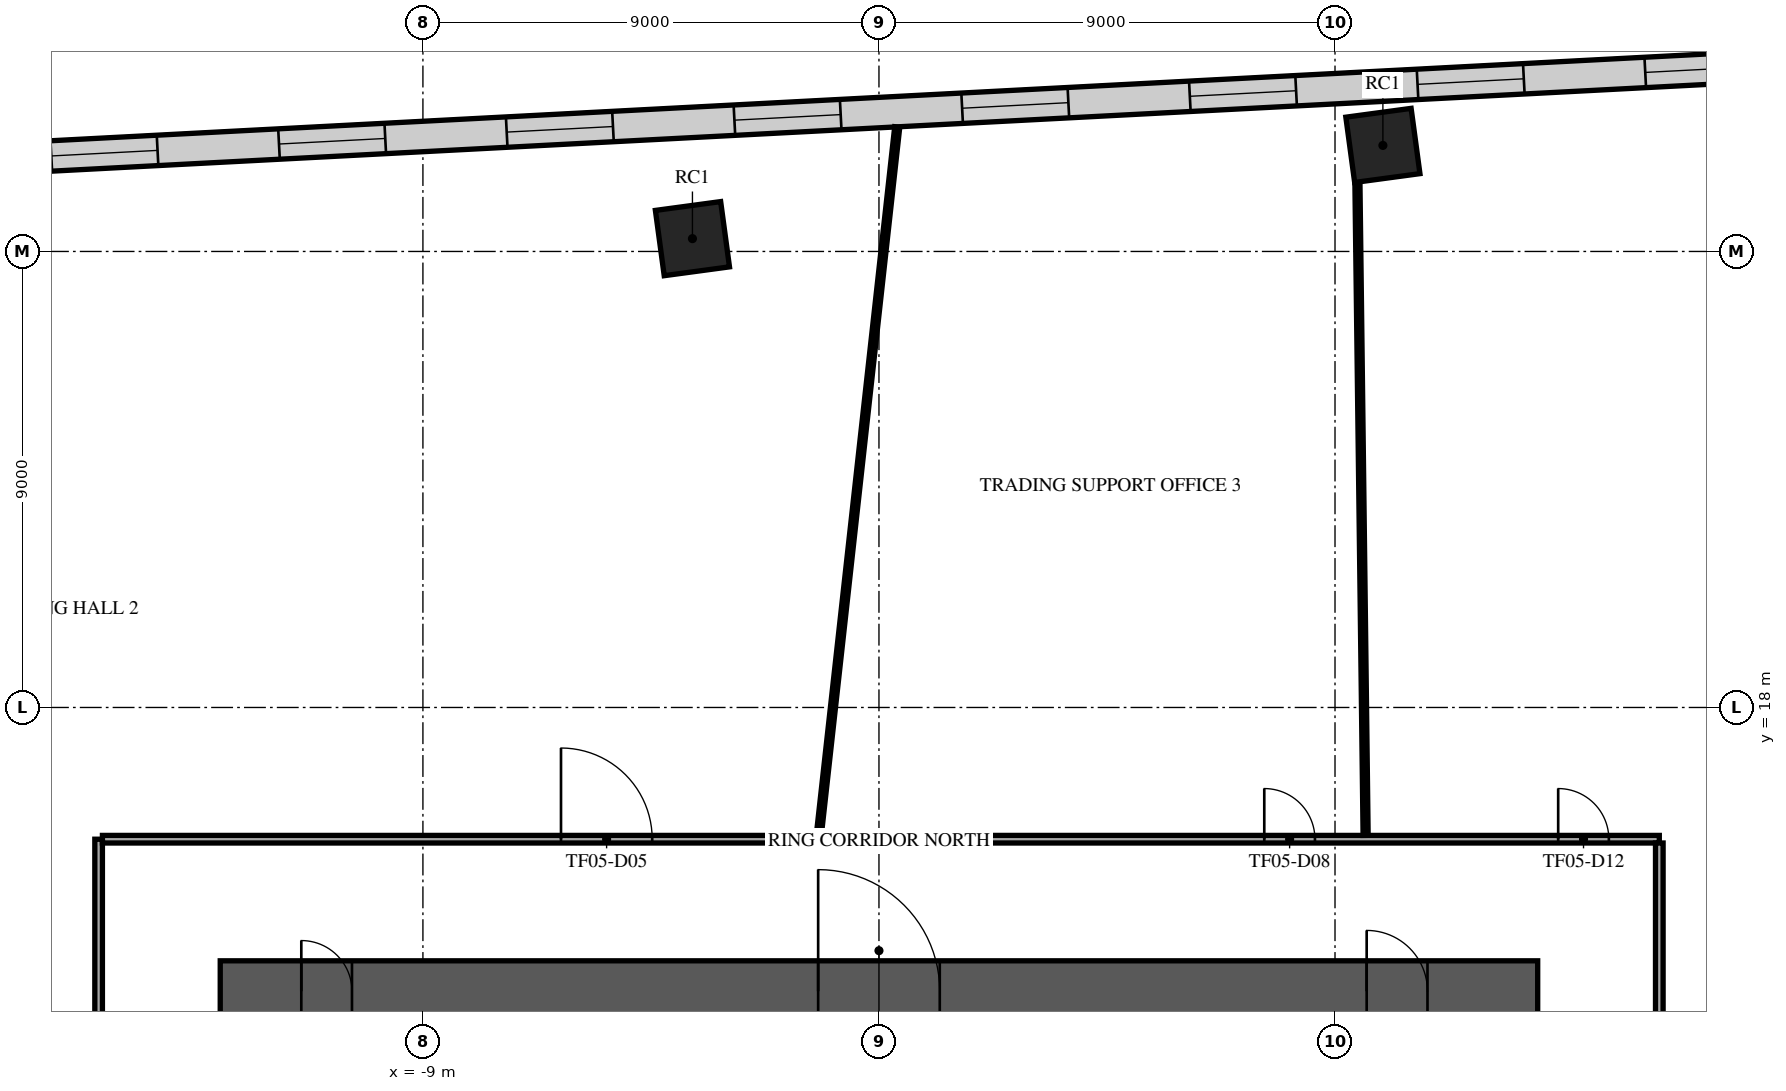
"""IFC4 building model, lengths in metres.
Left out: names, types, materials, properties, quantities, classifications, styles, units other than length and angle.
Written with IfcOpenShell. Run it as: python <this file> out.ifc"""

import sys

from ifc_helpers import new_model, si_unit, direction, frame, frame_2d, origin, origin_2d, place, context, subcontext, project, spatial, rectangle, extrude, element, fill, save


model = new_model("IFC4")
c1 = context("Model", 3, precision=1e-05, world=origin(), true_north=direction((0.0, 1.0)))
c2 = subcontext(c1, "Body", "Model", "MODEL_VIEW")
j1 = project(units=[si_unit("LENGTHUNIT", "METRE"), si_unit("PLANEANGLEUNIT", "RADIAN")], contexts=[c1])
p1 = place(None, origin())
s1 = spatial("IfcSite", under=j1, at=p1, CompositionType="ELEMENT")
p2 = place(p1, origin())
s2 = spatial("IfcBuilding", under=s1, at=p2, CompositionType="ELEMENT")
p3 = place(p2, frame((0.0, 0.0, 27.3)))
s3 = spatial("IfcBuildingStorey", under=s2, at=p3, CompositionType="ELEMENT", Elevation=27.3)
for number, where, z_axis, x_axis in (
    (1, (9.945, 29.093, 0.0), (0.0, 0.0, 1.0), (0.991, 0.134, 0.0)),
    (2, (-3.681, 27.253, 0.0), (0.0, 0.0, 1.0), (0.991, 0.134, 0.0)),
):
    element("IfcColumn", number, at=place(p3, frame(where, z_axis=z_axis, x_axis=x_axis)), inside=s3, PredefinedType="COLUMN", context=c2, shape_type="SweptSolid", body=[
        extrude(rectangle(XDim=1.3, YDim=1.3, at=origin_2d()), origin(), (0.0, 0.0, 1.0), 4.8),
    ])
p4 = place(p3, frame((-13.0, 12.4, 0.0), z_axis=(0.0, 0.0, 1.0), x_axis=(1.0, 0.0, 0.0)))
e3 = element("IfcWall", 3, at=p4, inside=s3, PredefinedType="SHEAR", context=c2, shape_type="SweptSolid", body=[
    extrude(rectangle(XDim=26.0, YDim=1.2, at=frame_2d((13.0, 0.0))), origin(), (0.0, 0.0, 1.0), 4.35),
])
p5 = place(p4, frame((11.8, 0.0, 0.0)))
e4 = element("IfcOpeningElement", 4, at=p5, cuts=e3, PredefinedType="OPENING", context=c2, shape_type="SweptSolid", body=[
    extrude(rectangle(XDim=2.4, YDim=2.4, at=frame_2d((1.2, 1.2))), frame((0.0, 0.61, 0.0), z_axis=(0.0, -1.0, 0.0), x_axis=(1.0, 0.0, 0.0)), (0.0, 0.0, 1.0), 1.22),
])
p6 = place(p4, frame((22.625, 0.0, 0.0)))
e5 = element("IfcOpeningElement", 5, at=p6, cuts=e3, PredefinedType="OPENING", context=c2, shape_type="SweptSolid", body=[
    extrude(rectangle(XDim=1.2, YDim=2.1, at=frame_2d((0.6, 1.05))), frame((0.0, 0.61, 0.0), z_axis=(0.0, -1.0, 0.0), x_axis=(1.0, 0.0, 0.0)), (0.0, 0.0, 1.0), 1.22),
])
p7 = place(p4, frame((1.6, 0.0, 0.0)))
e6 = element("IfcOpeningElement", 6, at=p7, cuts=e3, PredefinedType="OPENING", context=c2, shape_type="SweptSolid", body=[
    extrude(rectangle(XDim=1.0, YDim=2.1, at=frame_2d((0.5, 1.05))), frame((0.0, 0.61, 0.0), z_axis=(0.0, -1.0, 0.0), x_axis=(1.0, 0.0, 0.0)), (0.0, 0.0, 1.0), 1.22),
])
p8 = place(p3, frame((22.912, 30.941, 0.0), z_axis=(0.0, 0.0, 1.0), x_axis=(-0.998629687104, -0.052333049168, 0.0)))
e7 = element("IfcWall", 7, at=p8, inside=s3, PredefinedType="STANDARD", context=c2, shape_type="SweptSolid", body=[
    extrude(rectangle(XDim=49.376, YDim=0.6, at=frame_2d((24.688, 0.0))), origin(), (0.0, 0.0, 1.0), 4.35),
])
p9 = place(p8, frame((1.2, 0.0, 0.9)))
e8 = element("IfcOpeningElement", 8, at=p9, cuts=e7, PredefinedType="OPENING", context=c2, shape_type="SweptSolid", body=[
    extrude(rectangle(XDim=2.1, YDim=2.7, at=frame_2d((1.05, 1.35))), frame((0.0, 0.31, 0.0), z_axis=(0.0, -1.0, 0.0), x_axis=(1.0, 0.0, 0.0)), (0.0, 0.0, 1.0), 0.62),
])
p10 = place(p8, frame((5.7, 0.0, 0.9)))
e9 = element("IfcOpeningElement", 9, at=p10, cuts=e7, PredefinedType="OPENING", context=c2, shape_type="SweptSolid", body=[
    extrude(rectangle(XDim=2.1, YDim=2.7, at=frame_2d((1.05, 1.35))), frame((0.0, 0.31, 0.0), z_axis=(0.0, -1.0, 0.0), x_axis=(1.0, 0.0, 0.0)), (0.0, 0.0, 1.0), 0.62),
])
p11 = place(p8, frame((10.2, 0.0, 0.9)))
e10 = element("IfcOpeningElement", 10, at=p11, cuts=e7, PredefinedType="OPENING", context=c2, shape_type="SweptSolid", body=[
    extrude(rectangle(XDim=2.1, YDim=2.7, at=frame_2d((1.05, 1.35))), frame((0.0, 0.31, 0.0), z_axis=(0.0, -1.0, 0.0), x_axis=(1.0, 0.0, 0.0)), (0.0, 0.0, 1.0), 0.62),
])
p12 = place(p8, frame((14.7, 0.0, 0.9)))
e11 = element("IfcOpeningElement", 11, at=p12, cuts=e7, PredefinedType="OPENING", context=c2, shape_type="SweptSolid", body=[
    extrude(rectangle(XDim=2.1, YDim=2.7, at=frame_2d((1.05, 1.35))), frame((0.0, 0.31, 0.0), z_axis=(0.0, -1.0, 0.0), x_axis=(1.0, 0.0, 0.0)), (0.0, 0.0, 1.0), 0.62),
])
p13 = place(p8, frame((19.2, 0.0, 0.9)))
e12 = element("IfcOpeningElement", 12, at=p13, cuts=e7, PredefinedType="OPENING", context=c2, shape_type="SweptSolid", body=[
    extrude(rectangle(XDim=2.1, YDim=2.7, at=frame_2d((1.05, 1.35))), frame((0.0, 0.31, 0.0), z_axis=(0.0, -1.0, 0.0), x_axis=(1.0, 0.0, 0.0)), (0.0, 0.0, 1.0), 0.62),
])
p14 = place(p8, frame((23.7, 0.0, 0.9)))
e13 = element("IfcOpeningElement", 13, at=p14, cuts=e7, PredefinedType="OPENING", context=c2, shape_type="SweptSolid", body=[
    extrude(rectangle(XDim=2.1, YDim=2.7, at=frame_2d((1.05, 1.35))), frame((0.0, 0.31, 0.0), z_axis=(0.0, -1.0, 0.0), x_axis=(1.0, 0.0, 0.0)), (0.0, 0.0, 1.0), 0.62),
])
p15 = place(p8, frame((28.2, 0.0, 0.9)))
e14 = element("IfcOpeningElement", 14, at=p15, cuts=e7, PredefinedType="OPENING", context=c2, shape_type="SweptSolid", body=[
    extrude(rectangle(XDim=2.1, YDim=2.7, at=frame_2d((1.05, 1.35))), frame((0.0, 0.31, 0.0), z_axis=(0.0, -1.0, 0.0), x_axis=(1.0, 0.0, 0.0)), (0.0, 0.0, 1.0), 0.62),
])
p16 = place(p8, frame((32.7, 0.0, 0.9)))
e15 = element("IfcOpeningElement", 15, at=p16, cuts=e7, PredefinedType="OPENING", context=c2, shape_type="SweptSolid", body=[
    extrude(rectangle(XDim=2.1, YDim=2.7, at=frame_2d((1.05, 1.35))), frame((0.0, 0.31, 0.0), z_axis=(0.0, -1.0, 0.0), x_axis=(1.0, 0.0, 0.0)), (0.0, 0.0, 1.0), 0.62),
])
p17 = place(p8, frame((37.2, 0.0, 0.9)))
e16 = element("IfcOpeningElement", 16, at=p17, cuts=e7, PredefinedType="OPENING", context=c2, shape_type="SweptSolid", body=[
    extrude(rectangle(XDim=2.1, YDim=2.7, at=frame_2d((1.05, 1.35))), frame((0.0, 0.31, 0.0), z_axis=(0.0, -1.0, 0.0), x_axis=(1.0, 0.0, 0.0)), (0.0, 0.0, 1.0), 0.62),
])
p18 = place(p8, frame((41.7, 0.0, 0.9)))
e17 = element("IfcOpeningElement", 17, at=p18, cuts=e7, PredefinedType="OPENING", context=c2, shape_type="SweptSolid", body=[
    extrude(rectangle(XDim=2.1, YDim=2.7, at=frame_2d((1.05, 1.35))), frame((0.0, 0.31, 0.0), z_axis=(0.0, -1.0, 0.0), x_axis=(1.0, 0.0, 0.0)), (0.0, 0.0, 1.0), 0.62),
])
p19 = place(p8, frame((46.138, 0.0, 0.9)))
e18 = element("IfcOpeningElement", 18, at=p19, cuts=e7, PredefinedType="OPENING", context=c2, shape_type="SweptSolid", body=[
    extrude(rectangle(XDim=2.1, YDim=2.7, at=frame_2d((1.05, 1.35))), frame((0.0, 0.31, 0.0), z_axis=(0.0, -1.0, 0.0), x_axis=(1.0, 0.0, 0.0)), (0.0, 0.0, 1.0), 0.62),
])
p20 = place(p3, frame((-15.4, -15.4, 0.0), z_axis=(0.0, 0.0, 1.0), x_axis=(0.0, 1.0, 0.0)))
e19 = element("IfcWall", 19, at=p20, inside=s3, PredefinedType="PARTITIONING", context=c2, shape_type="SweptSolid", body=[
    extrude(rectangle(XDim=30.8, YDim=0.15, at=frame_2d((15.4, 0.0))), origin(), (0.0, 0.0, 1.0), 3.85),
])
p21 = place(p20, frame((17.342, 0.0, 0.0)))
e20 = element("IfcOpeningElement", 20, at=p21, cuts=e19, PredefinedType="OPENING", context=c2, shape_type="SweptSolid", body=[
    extrude(rectangle(XDim=1.8, YDim=2.1, at=frame_2d((0.9, 1.05))), frame((0.0, 0.085, 0.0), z_axis=(0.0, -1.0, 0.0), x_axis=(1.0, 0.0, 0.0)), (0.0, 0.0, 1.0), 0.17),
])
p22 = place(p20, frame((21.842, 0.0, 0.0)))
e21 = element("IfcOpeningElement", 21, at=p22, cuts=e19, PredefinedType="OPENING", context=c2, shape_type="SweptSolid", body=[
    extrude(rectangle(XDim=1.0, YDim=2.1, at=frame_2d((0.5, 1.05))), frame((0.0, 0.085, 0.0), z_axis=(0.0, -1.0, 0.0), x_axis=(1.0, 0.0, 0.0)), (0.0, 0.0, 1.0), 0.17),
])
p23 = place(p20, frame((4.05, 0.0, 0.0)))
e22 = element("IfcOpeningElement", 22, at=p23, cuts=e19, PredefinedType="OPENING", context=c2, shape_type="SweptSolid", body=[
    extrude(rectangle(XDim=1.8, YDim=2.1, at=frame_2d((0.9, 1.05))), frame((0.0, 0.085, 0.0), z_axis=(0.0, -1.0, 0.0), x_axis=(1.0, 0.0, 0.0)), (0.0, 0.0, 1.0), 0.17),
])
p24 = place(p20, frame((10.05, 0.0, 0.0)))
e23 = element("IfcOpeningElement", 23, at=p24, cuts=e19, PredefinedType="OPENING", context=c2, shape_type="SweptSolid", body=[
    extrude(rectangle(XDim=1.0, YDim=2.1, at=frame_2d((0.5, 1.05))), frame((0.0, 0.085, 0.0), z_axis=(0.0, -1.0, 0.0), x_axis=(1.0, 0.0, 0.0)), (0.0, 0.0, 1.0), 0.17),
])
p25 = place(p20, frame((24.266, 0.0, 0.0)))
e24 = element("IfcOpeningElement", 24, at=p25, cuts=e19, PredefinedType="OPENING", context=c2, shape_type="SweptSolid", body=[
    extrude(rectangle(XDim=1.0, YDim=2.1, at=frame_2d((0.5, 1.05))), frame((0.0, 0.085, 0.0), z_axis=(0.0, -1.0, 0.0), x_axis=(1.0, 0.0, 0.0)), (0.0, 0.0, 1.0), 0.17),
])
p26 = place(p3, frame((-15.325, 15.4, 0.0), z_axis=(0.0, 0.0, 1.0), x_axis=(1.0, 0.0, 0.0)))
e25 = element("IfcWall", 25, at=p26, inside=s3, PredefinedType="PARTITIONING", context=c2, shape_type="SweptSolid", body=[
    extrude(rectangle(XDim=30.725, YDim=0.15, at=frame_2d((15.362, 0.0))), origin(), (0.0, 0.0, 1.0), 3.85),
])
p27 = place(p26, frame((9.05, 0.0, 0.0)))
e26 = element("IfcOpeningElement", 26, at=p27, cuts=e25, PredefinedType="OPENING", context=c2, shape_type="SweptSolid", body=[
    extrude(rectangle(XDim=1.8, YDim=2.1, at=frame_2d((0.9, 1.05))), frame((0.0, 0.085, 0.0), z_axis=(0.0, -1.0, 0.0), x_axis=(1.0, 0.0, 0.0)), (0.0, 0.0, 1.0), 0.17),
])
p28 = place(p26, frame((22.929, 0.0, 0.0)))
e27 = element("IfcOpeningElement", 27, at=p28, cuts=e25, PredefinedType="OPENING", context=c2, shape_type="SweptSolid", body=[
    extrude(rectangle(XDim=1.0, YDim=2.1, at=frame_2d((0.5, 1.05))), frame((0.0, 0.085, 0.0), z_axis=(0.0, -1.0, 0.0), x_axis=(1.0, 0.0, 0.0)), (0.0, 0.0, 1.0), 0.17),
])
p29 = place(p26, frame((28.729, 0.0, 0.0)))
e28 = element("IfcOpeningElement", 28, at=p29, cuts=e25, PredefinedType="OPENING", context=c2, shape_type="SweptSolid", body=[
    extrude(rectangle(XDim=1.0, YDim=2.1, at=frame_2d((0.5, 1.05))), frame((0.0, 0.085, 0.0), z_axis=(0.0, -1.0, 0.0), x_axis=(1.0, 0.0, 0.0)), (0.0, 0.0, 1.0), 0.17),
])
p30 = place(p3, frame((15.4, -15.325, 0.0), z_axis=(0.0, 0.0, 1.0), x_axis=(0.0, 1.0, 0.0)))
e29 = element("IfcWall", 29, at=p30, inside=s3, PredefinedType="PARTITIONING", context=c2, shape_type="SweptSolid", body=[
    extrude(rectangle(XDim=30.65, YDim=0.15, at=frame_2d((15.325, 0.0))), origin(), (0.0, 0.0, 1.0), 3.85),
])
p31 = place(p30, frame((25.068, 0.0, 0.0)))
e30 = element("IfcOpeningElement", 30, at=p31, cuts=e29, PredefinedType="OPENING", context=c2, shape_type="SweptSolid", body=[
    extrude(rectangle(XDim=1.8, YDim=2.1, at=frame_2d((0.9, 1.05))), frame((0.0, 0.085, 0.0), z_axis=(0.0, -1.0, 0.0), x_axis=(1.0, 0.0, 0.0)), (0.0, 0.0, 1.0), 0.17),
])
p32 = place(p30, frame((10.927, 0.0, 0.0)))
e31 = element("IfcOpeningElement", 31, at=p32, cuts=e29, PredefinedType="OPENING", context=c2, shape_type="SweptSolid", body=[
    extrude(rectangle(XDim=1.0, YDim=2.1, at=frame_2d((0.5, 1.05))), frame((0.0, 0.085, 0.0), z_axis=(0.0, -1.0, 0.0), x_axis=(1.0, 0.0, 0.0)), (0.0, 0.0, 1.0), 0.17),
])
p33 = place(p3, frame((-1.187, 15.48, 0.0), z_axis=(0.0, 0.0, 1.0), x_axis=(0.110071375312, 0.993923685369, 0.0)))
e32 = element("IfcWall", 32, at=p33, inside=s3, PredefinedType="PARTITIONING", context=c2, shape_type="SweptSolid", body=[
    extrude(rectangle(XDim=14.062, YDim=0.1, at=frame_2d((7.031, 0.0))), origin(), (0.0, 0.0, 1.0), 3.55),
])
p34 = place(p3, frame((9.442, 28.369, 0.0), z_axis=(0.0, 0.0, 1.0), x_axis=(0.01255297586, -0.999921208294, 0.0)))
e33 = element("IfcWall", 33, at=p34, inside=s3, PredefinedType="PARTITIONING", context=c2, shape_type="SweptSolid", body=[
    extrude(rectangle(XDim=12.895, YDim=0.1, at=frame_2d((6.447, 0.0))), origin(), (0.0, 0.0, 1.0), 3.85),
])
p35 = place(p5, origin())
e34 = element("IfcDoor", 34, at=p35, inside=s3, OperationType="SINGLE_SWING_LEFT", PredefinedType="DOOR", context=c2, shape_type="SweptSolid", body=[
    extrude(rectangle(XDim=2.4, YDim=2.4, at=frame_2d((1.2, 1.2))), frame((0.0, 0.025, 0.0), z_axis=(0.0, -1.0, 0.0), x_axis=(1.0, 0.0, 0.0)), (0.0, 0.0, 1.0), 0.05),
])
fill(e4, e34)
p36 = place(p6, origin())
e35 = element("IfcDoor", 35, at=p36, inside=s3, OperationType="SINGLE_SWING_LEFT", PredefinedType="DOOR", context=c2, shape_type="SweptSolid", body=[
    extrude(rectangle(XDim=1.2, YDim=2.1, at=frame_2d((0.6, 1.05))), frame((0.0, 0.025, 0.0), z_axis=(0.0, -1.0, 0.0), x_axis=(1.0, 0.0, 0.0)), (0.0, 0.0, 1.0), 0.05),
])
fill(e5, e35)
p37 = place(p7, origin())
e36 = element("IfcDoor", 36, at=p37, inside=s3, OperationType="SINGLE_SWING_LEFT", PredefinedType="DOOR", context=c2, shape_type="SweptSolid", body=[
    extrude(rectangle(XDim=1.0, YDim=2.1, at=frame_2d((0.5, 1.05))), frame((0.0, 0.025, 0.0), z_axis=(0.0, -1.0, 0.0), x_axis=(1.0, 0.0, 0.0)), (0.0, 0.0, 1.0), 0.05),
])
fill(e6, e36)
p38 = place(p10, origin())
e37 = element("IfcWindow", 37, at=p38, inside=s3, PartitioningType="SINGLE_PANEL", PredefinedType="WINDOW", context=c2, shape_type="SweptSolid", body=[
    extrude(rectangle(XDim=2.1, YDim=2.7, at=frame_2d((1.05, 1.35))), frame((0.0, 0.03, 0.0), z_axis=(0.0, -1.0, 0.0), x_axis=(1.0, 0.0, 0.0)), (0.0, 0.0, 1.0), 0.06),
])
fill(e9, e37)
p39 = place(p11, origin())
e38 = element("IfcWindow", 38, at=p39, inside=s3, PartitioningType="SINGLE_PANEL", PredefinedType="WINDOW", context=c2, shape_type="SweptSolid", body=[
    extrude(rectangle(XDim=2.1, YDim=2.7, at=frame_2d((1.05, 1.35))), frame((0.0, 0.03, 0.0), z_axis=(0.0, -1.0, 0.0), x_axis=(1.0, 0.0, 0.0)), (0.0, 0.0, 1.0), 0.06),
])
fill(e10, e38)
p40 = place(p12, origin())
e39 = element("IfcWindow", 39, at=p40, inside=s3, PartitioningType="SINGLE_PANEL", PredefinedType="WINDOW", context=c2, shape_type="SweptSolid", body=[
    extrude(rectangle(XDim=2.1, YDim=2.7, at=frame_2d((1.05, 1.35))), frame((0.0, 0.03, 0.0), z_axis=(0.0, -1.0, 0.0), x_axis=(1.0, 0.0, 0.0)), (0.0, 0.0, 1.0), 0.06),
])
fill(e11, e39)
p41 = place(p13, origin())
e40 = element("IfcWindow", 40, at=p41, inside=s3, PartitioningType="SINGLE_PANEL", PredefinedType="WINDOW", context=c2, shape_type="SweptSolid", body=[
    extrude(rectangle(XDim=2.1, YDim=2.7, at=frame_2d((1.05, 1.35))), frame((0.0, 0.03, 0.0), z_axis=(0.0, -1.0, 0.0), x_axis=(1.0, 0.0, 0.0)), (0.0, 0.0, 1.0), 0.06),
])
fill(e12, e40)
p42 = place(p14, origin())
e41 = element("IfcWindow", 41, at=p42, inside=s3, PartitioningType="SINGLE_PANEL", PredefinedType="WINDOW", context=c2, shape_type="SweptSolid", body=[
    extrude(rectangle(XDim=2.1, YDim=2.7, at=frame_2d((1.05, 1.35))), frame((0.0, 0.03, 0.0), z_axis=(0.0, -1.0, 0.0), x_axis=(1.0, 0.0, 0.0)), (0.0, 0.0, 1.0), 0.06),
])
fill(e13, e41)
p43 = place(p15, origin())
e42 = element("IfcWindow", 42, at=p43, inside=s3, PartitioningType="SINGLE_PANEL", PredefinedType="WINDOW", context=c2, shape_type="SweptSolid", body=[
    extrude(rectangle(XDim=2.1, YDim=2.7, at=frame_2d((1.05, 1.35))), frame((0.0, 0.03, 0.0), z_axis=(0.0, -1.0, 0.0), x_axis=(1.0, 0.0, 0.0)), (0.0, 0.0, 1.0), 0.06),
])
fill(e14, e42)
p44 = place(p16, origin())
e43 = element("IfcWindow", 43, at=p44, inside=s3, PartitioningType="SINGLE_PANEL", PredefinedType="WINDOW", context=c2, shape_type="SweptSolid", body=[
    extrude(rectangle(XDim=2.1, YDim=2.7, at=frame_2d((1.05, 1.35))), frame((0.0, 0.03, 0.0), z_axis=(0.0, -1.0, 0.0), x_axis=(1.0, 0.0, 0.0)), (0.0, 0.0, 1.0), 0.06),
])
fill(e15, e43)
p45 = place(p17, origin())
e44 = element("IfcWindow", 44, at=p45, inside=s3, PartitioningType="SINGLE_PANEL", PredefinedType="WINDOW", context=c2, shape_type="SweptSolid", body=[
    extrude(rectangle(XDim=2.1, YDim=2.7, at=frame_2d((1.05, 1.35))), frame((0.0, 0.03, 0.0), z_axis=(0.0, -1.0, 0.0), x_axis=(1.0, 0.0, 0.0)), (0.0, 0.0, 1.0), 0.06),
])
fill(e16, e44)
p46 = place(p27, origin())
e45 = element("IfcDoor", 45, at=p46, inside=s3, OperationType="DOUBLE_DOOR_SINGLE_SWING", PredefinedType="DOOR", context=c2, shape_type="SweptSolid", body=[
    extrude(rectangle(XDim=1.8, YDim=2.1, at=frame_2d((0.9, 1.05))), frame((0.0, 0.025, 0.0), z_axis=(0.0, -1.0, 0.0), x_axis=(1.0, 0.0, 0.0)), (0.0, 0.0, 1.0), 0.05),
])
fill(e26, e45)
p47 = place(p28, origin())
e46 = element("IfcDoor", 46, at=p47, inside=s3, OperationType="SINGLE_SWING_RIGHT", PredefinedType="DOOR", context=c2, shape_type="SweptSolid", body=[
    extrude(rectangle(XDim=1.0, YDim=2.1, at=frame_2d((0.5, 1.05))), frame((0.0, 0.025, 0.0), z_axis=(0.0, -1.0, 0.0), x_axis=(1.0, 0.0, 0.0)), (0.0, 0.0, 1.0), 0.05),
])
fill(e27, e46)
p48 = place(p29, origin())
e47 = element("IfcDoor", 47, at=p48, inside=s3, OperationType="SINGLE_SWING_RIGHT", PredefinedType="DOOR", context=c2, shape_type="SweptSolid", body=[
    extrude(rectangle(XDim=1.0, YDim=2.1, at=frame_2d((0.5, 1.05))), frame((0.0, 0.025, 0.0), z_axis=(0.0, -1.0, 0.0), x_axis=(1.0, 0.0, 0.0)), (0.0, 0.0, 1.0), 0.05),
])
fill(e28, e47)
save(model, sys.argv[1])
